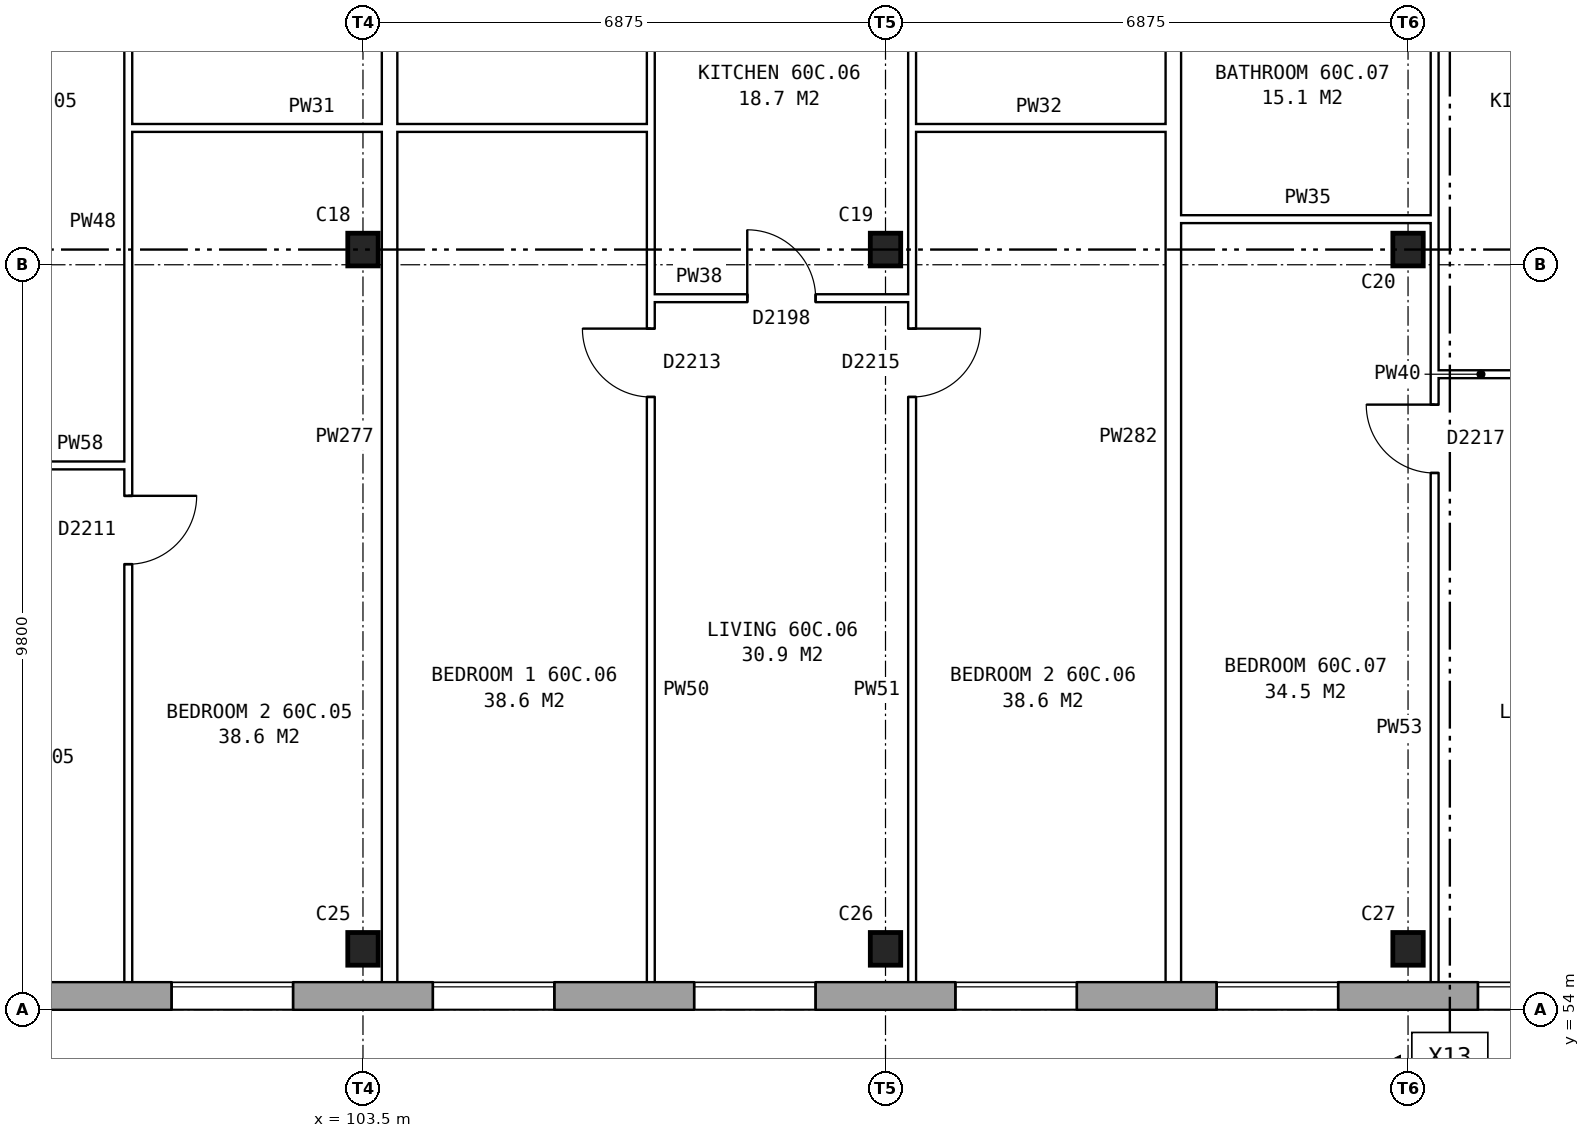
"""IFC4 building model, lengths in metres.
Left out: names, types, materials, properties, quantities, classifications, styles, units other than length and angle.
Written with IfcOpenShell. Run it as: python <this file> out.ifc"""

import sys

from ifc_helpers import new_model, si_unit, direction, frame, frame_2d, origin, origin_2d, place, context, subcontext, project, spatial, rectangle, i_section, extrude, element, fill, save


model = new_model("IFC4")
c1 = context("Model", 3, precision=1e-05, world=origin(), true_north=direction((0.0, 1.0)))
c2 = subcontext(c1, "Body", "Model", "MODEL_VIEW")
j1 = project(units=[si_unit("LENGTHUNIT", "METRE"), si_unit("PLANEANGLEUNIT", "RADIAN")], contexts=[c1])
p1 = place(None, origin())
s1 = spatial("IfcSite", under=j1, at=p1, CompositionType="ELEMENT")
p2 = place(p1, origin())
s2 = spatial("IfcBuilding", under=s1, at=p2, CompositionType="ELEMENT")
p3 = place(p2, frame((0.0, 0.0, 212.1)))
s3 = spatial("IfcBuildingStorey", under=s2, at=p3, CompositionType="ELEMENT", Elevation=212.1)
for number, where, z_axis, x_axis in (
    (1, (103.5, 54.8, 0.0), (0.0, 0.0, 1.0), (1.0, 0.0, 0.0)),
    (2, (110.375, 54.8, 0.0), (0.0, 0.0, 1.0), (1.0, 0.0, 0.0)),
    (3, (117.25, 54.8, 0.0), (0.0, 0.0, 1.0), (1.0, 0.0, 0.0)),
    (4, (103.5, 64.0, 0.0), (0.0, 0.0, 1.0), (1.0, 0.0, 0.0)),
    (5, (110.375, 64.0, 0.0), (0.0, 0.0, 1.0), (1.0, 0.0, 0.0)),
    (6, (117.25, 64.0, 0.0), (0.0, 0.0, 1.0), (1.0, 0.0, 0.0)),
):
    element("IfcColumn", number, at=place(p3, frame(where, z_axis=z_axis, x_axis=x_axis)), inside=s3, PredefinedType="COLUMN", context=c2, shape_type="SweptSolid", body=[
        extrude(i_section(OverallWidth=0.4, OverallDepth=0.43, WebThickness=0.04, FlangeThickness=0.04, at=origin_2d()), origin(), (0.0, 0.0, 1.0), 2.85),
    ])
p4 = place(p3, frame((75.95, 54.18, 0.0), z_axis=(0.0, 0.0, 1.0), x_axis=(1.0, 0.0, 0.0)))
e7 = element("IfcWall", 7, at=p4, inside=s3, PredefinedType="STANDARD", context=c2, shape_type="SweptSolid", body=[
    extrude(rectangle(XDim=55.1, YDim=0.36, at=frame_2d((27.55, 0.0))), origin(), (0.0, 0.0, 1.0), 2.85),
])
p5 = place(p4, frame((0.969, 0.0, 0.8)))
e8 = element("IfcOpeningElement", 8, at=p5, cuts=e7, PredefinedType="OPENING", context=c2, shape_type="SweptSolid", body=[
    extrude(rectangle(XDim=1.6, YDim=1.8, at=frame_2d((0.8, 0.9))), frame((0.0, 0.19, 0.0), z_axis=(0.0, -1.0, 0.0), x_axis=(1.0, 0.0, 0.0)), (0.0, 0.0, 1.0), 0.38),
])
p6 = place(p4, frame((4.406, 0.0, 0.8)))
e9 = element("IfcOpeningElement", 9, at=p6, cuts=e7, PredefinedType="OPENING", context=c2, shape_type="SweptSolid", body=[
    extrude(rectangle(XDim=1.6, YDim=1.8, at=frame_2d((0.8, 0.9))), frame((0.0, 0.19, 0.0), z_axis=(0.0, -1.0, 0.0), x_axis=(1.0, 0.0, 0.0)), (0.0, 0.0, 1.0), 0.38),
])
p7 = place(p4, frame((7.844, 0.0, 0.8)))
e10 = element("IfcOpeningElement", 10, at=p7, cuts=e7, PredefinedType="OPENING", context=c2, shape_type="SweptSolid", body=[
    extrude(rectangle(XDim=1.6, YDim=1.8, at=frame_2d((0.8, 0.9))), frame((0.0, 0.19, 0.0), z_axis=(0.0, -1.0, 0.0), x_axis=(1.0, 0.0, 0.0)), (0.0, 0.0, 1.0), 0.38),
])
p8 = place(p4, frame((11.281, 0.0, 0.8)))
e11 = element("IfcOpeningElement", 11, at=p8, cuts=e7, PredefinedType="OPENING", context=c2, shape_type="SweptSolid", body=[
    extrude(rectangle(XDim=1.6, YDim=1.8, at=frame_2d((0.8, 0.9))), frame((0.0, 0.19, 0.0), z_axis=(0.0, -1.0, 0.0), x_axis=(1.0, 0.0, 0.0)), (0.0, 0.0, 1.0), 0.38),
])
p9 = place(p4, frame((14.719, 0.0, 0.8)))
e12 = element("IfcOpeningElement", 12, at=p9, cuts=e7, PredefinedType="OPENING", context=c2, shape_type="SweptSolid", body=[
    extrude(rectangle(XDim=1.6, YDim=1.8, at=frame_2d((0.8, 0.9))), frame((0.0, 0.19, 0.0), z_axis=(0.0, -1.0, 0.0), x_axis=(1.0, 0.0, 0.0)), (0.0, 0.0, 1.0), 0.38),
])
p10 = place(p4, frame((18.156, 0.0, 0.8)))
e13 = element("IfcOpeningElement", 13, at=p10, cuts=e7, PredefinedType="OPENING", context=c2, shape_type="SweptSolid", body=[
    extrude(rectangle(XDim=1.6, YDim=1.8, at=frame_2d((0.8, 0.9))), frame((0.0, 0.19, 0.0), z_axis=(0.0, -1.0, 0.0), x_axis=(1.0, 0.0, 0.0)), (0.0, 0.0, 1.0), 0.38),
])
p11 = place(p4, frame((21.594, 0.0, 0.8)))
e14 = element("IfcOpeningElement", 14, at=p11, cuts=e7, PredefinedType="OPENING", context=c2, shape_type="SweptSolid", body=[
    extrude(rectangle(XDim=1.6, YDim=1.8, at=frame_2d((0.8, 0.9))), frame((0.0, 0.19, 0.0), z_axis=(0.0, -1.0, 0.0), x_axis=(1.0, 0.0, 0.0)), (0.0, 0.0, 1.0), 0.38),
])
p12 = place(p4, frame((25.031, 0.0, 0.8)))
e15 = element("IfcOpeningElement", 15, at=p12, cuts=e7, PredefinedType="OPENING", context=c2, shape_type="SweptSolid", body=[
    extrude(rectangle(XDim=1.6, YDim=1.8, at=frame_2d((0.8, 0.9))), frame((0.0, 0.19, 0.0), z_axis=(0.0, -1.0, 0.0), x_axis=(1.0, 0.0, 0.0)), (0.0, 0.0, 1.0), 0.38),
])
p13 = place(p4, frame((28.469, 0.0, 0.8)))
e16 = element("IfcOpeningElement", 16, at=p13, cuts=e7, PredefinedType="OPENING", context=c2, shape_type="SweptSolid", body=[
    extrude(rectangle(XDim=1.6, YDim=1.8, at=frame_2d((0.8, 0.9))), frame((0.0, 0.19, 0.0), z_axis=(0.0, -1.0, 0.0), x_axis=(1.0, 0.0, 0.0)), (0.0, 0.0, 1.0), 0.38),
])
p14 = place(p4, frame((31.906, 0.0, 0.8)))
e17 = element("IfcOpeningElement", 17, at=p14, cuts=e7, PredefinedType="OPENING", context=c2, shape_type="SweptSolid", body=[
    extrude(rectangle(XDim=1.6, YDim=1.8, at=frame_2d((0.8, 0.9))), frame((0.0, 0.19, 0.0), z_axis=(0.0, -1.0, 0.0), x_axis=(1.0, 0.0, 0.0)), (0.0, 0.0, 1.0), 0.38),
])
p15 = place(p4, frame((35.344, 0.0, 0.8)))
e18 = element("IfcOpeningElement", 18, at=p15, cuts=e7, PredefinedType="OPENING", context=c2, shape_type="SweptSolid", body=[
    extrude(rectangle(XDim=1.6, YDim=1.8, at=frame_2d((0.8, 0.9))), frame((0.0, 0.19, 0.0), z_axis=(0.0, -1.0, 0.0), x_axis=(1.0, 0.0, 0.0)), (0.0, 0.0, 1.0), 0.38),
])
p16 = place(p4, frame((38.781, 0.0, 0.8)))
e19 = element("IfcOpeningElement", 19, at=p16, cuts=e7, PredefinedType="OPENING", context=c2, shape_type="SweptSolid", body=[
    extrude(rectangle(XDim=1.6, YDim=1.8, at=frame_2d((0.8, 0.9))), frame((0.0, 0.19, 0.0), z_axis=(0.0, -1.0, 0.0), x_axis=(1.0, 0.0, 0.0)), (0.0, 0.0, 1.0), 0.38),
])
p17 = place(p4, frame((42.219, 0.0, 0.8)))
e20 = element("IfcOpeningElement", 20, at=p17, cuts=e7, PredefinedType="OPENING", context=c2, shape_type="SweptSolid", body=[
    extrude(rectangle(XDim=1.6, YDim=1.8, at=frame_2d((0.8, 0.9))), frame((0.0, 0.19, 0.0), z_axis=(0.0, -1.0, 0.0), x_axis=(1.0, 0.0, 0.0)), (0.0, 0.0, 1.0), 0.38),
])
p18 = place(p4, frame((45.656, 0.0, 0.8)))
e21 = element("IfcOpeningElement", 21, at=p18, cuts=e7, PredefinedType="OPENING", context=c2, shape_type="SweptSolid", body=[
    extrude(rectangle(XDim=1.6, YDim=1.8, at=frame_2d((0.8, 0.9))), frame((0.0, 0.19, 0.0), z_axis=(0.0, -1.0, 0.0), x_axis=(1.0, 0.0, 0.0)), (0.0, 0.0, 1.0), 0.38),
])
p19 = place(p4, frame((49.094, 0.0, 0.8)))
e22 = element("IfcOpeningElement", 22, at=p19, cuts=e7, PredefinedType="OPENING", context=c2, shape_type="SweptSolid", body=[
    extrude(rectangle(XDim=1.6, YDim=1.8, at=frame_2d((0.8, 0.9))), frame((0.0, 0.19, 0.0), z_axis=(0.0, -1.0, 0.0), x_axis=(1.0, 0.0, 0.0)), (0.0, 0.0, 1.0), 0.38),
])
p20 = place(p4, frame((52.531, 0.0, 0.8)))
e23 = element("IfcOpeningElement", 23, at=p20, cuts=e7, PredefinedType="OPENING", context=c2, shape_type="SweptSolid", body=[
    extrude(rectangle(XDim=1.6, YDim=1.8, at=frame_2d((0.8, 0.9))), frame((0.0, 0.19, 0.0), z_axis=(0.0, -1.0, 0.0), x_axis=(1.0, 0.0, 0.0)), (0.0, 0.0, 1.0), 0.38),
])
p21 = place(p3, frame((96.975, 61.16, 0.0), z_axis=(0.0, 0.0, 1.0), x_axis=(1.0, 0.0, 0.0)))
e24 = element("IfcWall", 24, at=p21, inside=s3, PredefinedType="PARTITIONING", context=c2, shape_type="SweptSolid", body=[
    extrude(rectangle(XDim=3.437, YDim=0.1, at=frame_2d((1.719, 0.0))), origin(), (0.0, 0.0, 1.0), 2.85),
])
p22 = place(p21, frame((1.269, 0.0, 0.0)))
e25 = element("IfcOpeningElement", 25, at=p22, cuts=e24, PredefinedType="OPENING", context=c2, shape_type="SweptSolid", body=[
    extrude(rectangle(XDim=0.9, YDim=2.1, at=frame_2d((0.45, 1.05))), frame((0.0, 0.06, 0.0), z_axis=(0.0, -1.0, 0.0), x_axis=(1.0, 0.0, 0.0)), (0.0, 0.0, 1.0), 0.12),
])
p23 = place(p3, frame((117.6, 62.36, 0.0), z_axis=(0.0, 0.0, 1.0), x_axis=(1.0, 0.0, 0.0)))
e26 = element("IfcWall", 26, at=p23, inside=s3, PredefinedType="PARTITIONING", context=c2, shape_type="SweptSolid", body=[
    extrude(rectangle(XDim=3.337, YDim=0.1, at=frame_2d((1.668, 0.0))), origin(), (0.0, 0.0, 1.0), 2.85),
])
p24 = place(p23, frame((1.219, 0.0, 0.0)))
e27 = element("IfcOpeningElement", 27, at=p24, cuts=e26, PredefinedType="OPENING", context=c2, shape_type="SweptSolid", body=[
    extrude(rectangle(XDim=0.9, YDim=2.1, at=frame_2d((0.45, 1.05))), frame((0.0, 0.06, 0.0), z_axis=(0.0, -1.0, 0.0), x_axis=(1.0, 0.0, 0.0)), (0.0, 0.0, 1.0), 0.12),
])
p25 = place(p3, frame((107.287, 63.36, 0.0), z_axis=(0.0, 0.0, 1.0), x_axis=(1.0, 0.0, 0.0)))
e28 = element("IfcWall", 28, at=p25, inside=s3, PredefinedType="PARTITIONING", context=c2, shape_type="SweptSolid", body=[
    extrude(rectangle(XDim=3.438, YDim=0.1, at=frame_2d((1.719, 0.0))), origin(), (0.0, 0.0, 1.0), 2.85),
])
p26 = place(p25, frame((1.269, 0.0, 0.0)))
e29 = element("IfcOpeningElement", 29, at=p26, cuts=e28, PredefinedType="OPENING", context=c2, shape_type="SweptSolid", body=[
    extrude(rectangle(XDim=0.9, YDim=2.1, at=frame_2d((0.45, 1.05))), frame((0.0, 0.06, 0.0), z_axis=(0.0, -1.0, 0.0), x_axis=(1.0, 0.0, 0.0)), (0.0, 0.0, 1.0), 0.12),
])
p27 = place(p3, frame((114.262, 64.4, 0.0), z_axis=(0.0, 0.0, 1.0), x_axis=(1.0, 0.0, 0.0)))
e30 = element("IfcWall", 30, at=p27, inside=s3, PredefinedType="PARTITIONING", context=c2, shape_type="SweptSolid", body=[
    extrude(rectangle(XDim=3.338, YDim=0.1, at=frame_2d((1.669, 0.0))), origin(), (0.0, 0.0, 1.0), 2.85),
])
p28 = place(p3, frame((100.412, 65.6, 0.0), z_axis=(0.0, 0.0, 1.0), x_axis=(1.0, 0.0, 0.0)))
e31 = element("IfcWall", 31, at=p28, inside=s3, PredefinedType="PARTITIONING", context=c2, shape_type="SweptSolid", body=[
    extrude(rectangle(XDim=6.875, YDim=0.1, at=frame_2d((3.438, 0.0))), origin(), (0.0, 0.0, 1.0), 2.85),
])
p29 = place(p3, frame((110.725, 65.6, 0.0), z_axis=(0.0, 0.0, 1.0), x_axis=(1.0, 0.0, 0.0)))
e32 = element("IfcWall", 32, at=p29, inside=s3, PredefinedType="PARTITIONING", context=c2, shape_type="SweptSolid", body=[
    extrude(rectangle(XDim=3.337, YDim=0.1, at=frame_2d((1.668, 0.0))), origin(), (0.0, 0.0, 1.0), 2.85),
])
p30 = place(p3, frame((100.412, 54.36, 0.0), z_axis=(0.0, 0.0, 1.0), x_axis=(0.0, 1.0, 0.0)))
e33 = element("IfcWall", 33, at=p30, inside=s3, PredefinedType="PARTITIONING", context=c2, shape_type="SweptSolid", body=[
    extrude(rectangle(XDim=14.34, YDim=0.1, at=frame_2d((7.17, 0.0))), origin(), (0.0, 0.0, 1.0), 2.85),
])
p31 = place(p30, frame((5.5, 0.0, 0.0)))
e34 = element("IfcOpeningElement", 34, at=p31, cuts=e33, PredefinedType="OPENING", context=c2, shape_type="SweptSolid", body=[
    extrude(rectangle(XDim=0.9, YDim=2.1, at=frame_2d((0.45, 1.05))), frame((0.0, 0.06, 0.0), z_axis=(0.0, -1.0, 0.0), x_axis=(1.0, 0.0, 0.0)), (0.0, 0.0, 1.0), 0.12),
])
p32 = place(p30, frame((13.04, 0.0, 0.0)))
e35 = element("IfcOpeningElement", 35, at=p32, cuts=e33, PredefinedType="OPENING", context=c2, shape_type="SweptSolid", body=[
    extrude(rectangle(XDim=0.9, YDim=2.1, at=frame_2d((0.45, 1.05))), frame((0.0, 0.06, 0.0), z_axis=(0.0, -1.0, 0.0), x_axis=(1.0, 0.0, 0.0)), (0.0, 0.0, 1.0), 0.12),
])
p33 = place(p3, frame((103.85, 54.36, 0.0), z_axis=(0.0, 0.0, 1.0), x_axis=(0.0, 1.0, 0.0)))
e36 = element("IfcWall", 36, at=p33, inside=s3, PredefinedType="PARTITIONING", context=c2, shape_type="SweptSolid", body=[
    extrude(rectangle(XDim=14.34, YDim=0.2, at=frame_2d((7.17, 0.0))), origin(), (0.0, 0.0, 1.0), 2.85),
])
p34 = place(p3, frame((107.287, 54.36, 0.0), z_axis=(0.0, 0.0, 1.0), x_axis=(0.0, 1.0, 0.0)))
e37 = element("IfcWall", 37, at=p34, inside=s3, PredefinedType="PARTITIONING", context=c2, shape_type="SweptSolid", body=[
    extrude(rectangle(XDim=14.34, YDim=0.1, at=frame_2d((7.17, 0.0))), origin(), (0.0, 0.0, 1.0), 2.85),
])
p35 = place(p34, frame((7.7, 0.0, 0.0)))
e38 = element("IfcOpeningElement", 38, at=p35, cuts=e37, PredefinedType="OPENING", context=c2, shape_type="SweptSolid", body=[
    extrude(rectangle(XDim=0.9, YDim=2.1, at=frame_2d((0.45, 1.05))), frame((0.0, 0.06, 0.0), z_axis=(0.0, -1.0, 0.0), x_axis=(1.0, 0.0, 0.0)), (0.0, 0.0, 1.0), 0.12),
])
p36 = place(p34, frame((13.04, 0.0, 0.0)))
e39 = element("IfcOpeningElement", 39, at=p36, cuts=e37, PredefinedType="OPENING", context=c2, shape_type="SweptSolid", body=[
    extrude(rectangle(XDim=0.9, YDim=2.1, at=frame_2d((0.45, 1.05))), frame((0.0, 0.06, 0.0), z_axis=(0.0, -1.0, 0.0), x_axis=(1.0, 0.0, 0.0)), (0.0, 0.0, 1.0), 0.12),
])
p37 = place(p3, frame((110.725, 54.36, 0.0), z_axis=(0.0, 0.0, 1.0), x_axis=(0.0, 1.0, 0.0)))
e40 = element("IfcWall", 40, at=p37, inside=s3, PredefinedType="PARTITIONING", context=c2, shape_type="SweptSolid", body=[
    extrude(rectangle(XDim=14.34, YDim=0.1, at=frame_2d((7.17, 0.0))), origin(), (0.0, 0.0, 1.0), 2.85),
])
p38 = place(p37, frame((7.7, 0.0, 0.0)))
e41 = element("IfcOpeningElement", 41, at=p38, cuts=e40, PredefinedType="OPENING", context=c2, shape_type="SweptSolid", body=[
    extrude(rectangle(XDim=0.9, YDim=2.1, at=frame_2d((0.45, 1.05))), frame((0.0, 0.06, 0.0), z_axis=(0.0, -1.0, 0.0), x_axis=(1.0, 0.0, 0.0)), (0.0, 0.0, 1.0), 0.12),
])
p39 = place(p37, frame((13.04, 0.0, 0.0)))
e42 = element("IfcOpeningElement", 42, at=p39, cuts=e40, PredefinedType="OPENING", context=c2, shape_type="SweptSolid", body=[
    extrude(rectangle(XDim=0.9, YDim=2.1, at=frame_2d((0.45, 1.05))), frame((0.0, 0.06, 0.0), z_axis=(0.0, -1.0, 0.0), x_axis=(1.0, 0.0, 0.0)), (0.0, 0.0, 1.0), 0.12),
])
p40 = place(p3, frame((114.162, 54.36, 0.0), z_axis=(0.0, 0.0, 1.0), x_axis=(0.0, 1.0, 0.0)))
e43 = element("IfcWall", 43, at=p40, inside=s3, PredefinedType="PARTITIONING", context=c2, shape_type="SweptSolid", body=[
    extrude(rectangle(XDim=14.34, YDim=0.2, at=frame_2d((7.17, 0.0))), origin(), (0.0, 0.0, 1.0), 2.85),
])
p41 = place(p3, frame((117.6, 54.36, 0.0), z_axis=(0.0, 0.0, 1.0), x_axis=(0.0, 1.0, 0.0)))
e44 = element("IfcWall", 44, at=p41, inside=s3, PredefinedType="PARTITIONING", context=c2, shape_type="SweptSolid", body=[
    extrude(rectangle(XDim=14.34, YDim=0.1, at=frame_2d((7.17, 0.0))), origin(), (0.0, 0.0, 1.0), 2.85),
])
p42 = place(p41, frame((6.7, 0.0, 0.0)))
e45 = element("IfcOpeningElement", 45, at=p42, cuts=e44, PredefinedType="OPENING", context=c2, shape_type="SweptSolid", body=[
    extrude(rectangle(XDim=0.9, YDim=2.1, at=frame_2d((0.45, 1.05))), frame((0.0, 0.06, 0.0), z_axis=(0.0, -1.0, 0.0), x_axis=(1.0, 0.0, 0.0)), (0.0, 0.0, 1.0), 0.12),
])
p43 = place(p41, frame((13.04, 0.0, 0.0)))
e46 = element("IfcOpeningElement", 46, at=p43, cuts=e44, PredefinedType="OPENING", context=c2, shape_type="SweptSolid", body=[
    extrude(rectangle(XDim=0.9, YDim=2.1, at=frame_2d((0.45, 1.05))), frame((0.0, 0.06, 0.0), z_axis=(0.0, -1.0, 0.0), x_axis=(1.0, 0.0, 0.0)), (0.0, 0.0, 1.0), 0.12),
])
p44 = place(p12, origin())
e47 = element("IfcWindow", 47, at=p44, inside=s3, PartitioningType="SINGLE_PANEL", PredefinedType="WINDOW", context=c2, shape_type="SweptSolid", body=[
    extrude(rectangle(XDim=1.6, YDim=1.8, at=frame_2d((0.8, 0.9))), frame((0.0, 0.15, 0.0), z_axis=(0.0, -1.0, 0.0), x_axis=(1.0, 0.0, 0.0)), (0.0, 0.0, 1.0), 0.06),
])
fill(e15, e47)
p45 = place(p13, origin())
e48 = element("IfcWindow", 48, at=p45, inside=s3, PartitioningType="SINGLE_PANEL", PredefinedType="WINDOW", context=c2, shape_type="SweptSolid", body=[
    extrude(rectangle(XDim=1.6, YDim=1.8, at=frame_2d((0.8, 0.9))), frame((0.0, 0.15, 0.0), z_axis=(0.0, -1.0, 0.0), x_axis=(1.0, 0.0, 0.0)), (0.0, 0.0, 1.0), 0.06),
])
fill(e16, e48)
p46 = place(p14, origin())
e49 = element("IfcWindow", 49, at=p46, inside=s3, PartitioningType="SINGLE_PANEL", PredefinedType="WINDOW", context=c2, shape_type="SweptSolid", body=[
    extrude(rectangle(XDim=1.6, YDim=1.8, at=frame_2d((0.8, 0.9))), frame((0.0, 0.15, 0.0), z_axis=(0.0, -1.0, 0.0), x_axis=(1.0, 0.0, 0.0)), (0.0, 0.0, 1.0), 0.06),
])
fill(e17, e49)
p47 = place(p15, origin())
e50 = element("IfcWindow", 50, at=p47, inside=s3, PartitioningType="SINGLE_PANEL", PredefinedType="WINDOW", context=c2, shape_type="SweptSolid", body=[
    extrude(rectangle(XDim=1.6, YDim=1.8, at=frame_2d((0.8, 0.9))), frame((0.0, 0.15, 0.0), z_axis=(0.0, -1.0, 0.0), x_axis=(1.0, 0.0, 0.0)), (0.0, 0.0, 1.0), 0.06),
])
fill(e18, e50)
p48 = place(p16, origin())
e51 = element("IfcWindow", 51, at=p48, inside=s3, PartitioningType="SINGLE_PANEL", PredefinedType="WINDOW", context=c2, shape_type="SweptSolid", body=[
    extrude(rectangle(XDim=1.6, YDim=1.8, at=frame_2d((0.8, 0.9))), frame((0.0, 0.15, 0.0), z_axis=(0.0, -1.0, 0.0), x_axis=(1.0, 0.0, 0.0)), (0.0, 0.0, 1.0), 0.06),
])
fill(e19, e51)
p49 = place(p17, origin())
e52 = element("IfcWindow", 52, at=p49, inside=s3, PartitioningType="SINGLE_PANEL", PredefinedType="WINDOW", context=c2, shape_type="SweptSolid", body=[
    extrude(rectangle(XDim=1.6, YDim=1.8, at=frame_2d((0.8, 0.9))), frame((0.0, 0.15, 0.0), z_axis=(0.0, -1.0, 0.0), x_axis=(1.0, 0.0, 0.0)), (0.0, 0.0, 1.0), 0.06),
])
fill(e20, e52)
p50 = place(p31, frame((0.9, 0.0, 0.0), z_axis=(0.0, 0.0, 1.0), x_axis=(-1.0, 0.0, 0.0)))
e53 = element("IfcDoor", 53, at=p50, inside=s3, OperationType="SINGLE_SWING_LEFT", PredefinedType="DOOR", context=c2, shape_type="SweptSolid", body=[
    extrude(rectangle(XDim=0.9, YDim=2.1, at=frame_2d((0.45, 1.05))), frame((0.0, 0.025, 0.0), z_axis=(0.0, -1.0, 0.0), x_axis=(1.0, 0.0, 0.0)), (0.0, 0.0, 1.0), 0.05),
])
fill(e34, e53)
p51 = place(p35, origin())
e54 = element("IfcDoor", 54, at=p51, inside=s3, OperationType="SINGLE_SWING_RIGHT", PredefinedType="DOOR", context=c2, shape_type="SweptSolid", body=[
    extrude(rectangle(XDim=0.9, YDim=2.1, at=frame_2d((0.45, 1.05))), frame((0.0, 0.025, 0.0), z_axis=(0.0, -1.0, 0.0), x_axis=(1.0, 0.0, 0.0)), (0.0, 0.0, 1.0), 0.05),
])
fill(e38, e54)
p52 = place(p38, frame((0.9, 0.0, 0.0), z_axis=(0.0, 0.0, 1.0), x_axis=(-1.0, 0.0, 0.0)))
e55 = element("IfcDoor", 55, at=p52, inside=s3, OperationType="SINGLE_SWING_LEFT", PredefinedType="DOOR", context=c2, shape_type="SweptSolid", body=[
    extrude(rectangle(XDim=0.9, YDim=2.1, at=frame_2d((0.45, 1.05))), frame((0.0, 0.025, 0.0), z_axis=(0.0, -1.0, 0.0), x_axis=(1.0, 0.0, 0.0)), (0.0, 0.0, 1.0), 0.05),
])
fill(e41, e55)
p53 = place(p26, origin())
e56 = element("IfcDoor", 56, at=p53, inside=s3, OperationType="SINGLE_SWING_LEFT", PredefinedType="DOOR", context=c2, shape_type="SweptSolid", body=[
    extrude(rectangle(XDim=0.9, YDim=2.1, at=frame_2d((0.45, 1.05))), frame((0.0, 0.025, 0.0), z_axis=(0.0, -1.0, 0.0), x_axis=(1.0, 0.0, 0.0)), (0.0, 0.0, 1.0), 0.05),
])
fill(e29, e56)
p54 = place(p42, origin())
e57 = element("IfcDoor", 57, at=p54, inside=s3, OperationType="SINGLE_SWING_RIGHT", PredefinedType="DOOR", context=c2, shape_type="SweptSolid", body=[
    extrude(rectangle(XDim=0.9, YDim=2.1, at=frame_2d((0.45, 1.05))), frame((0.0, 0.025, 0.0), z_axis=(0.0, -1.0, 0.0), x_axis=(1.0, 0.0, 0.0)), (0.0, 0.0, 1.0), 0.05),
])
fill(e45, e57)
save(model, sys.argv[1])
